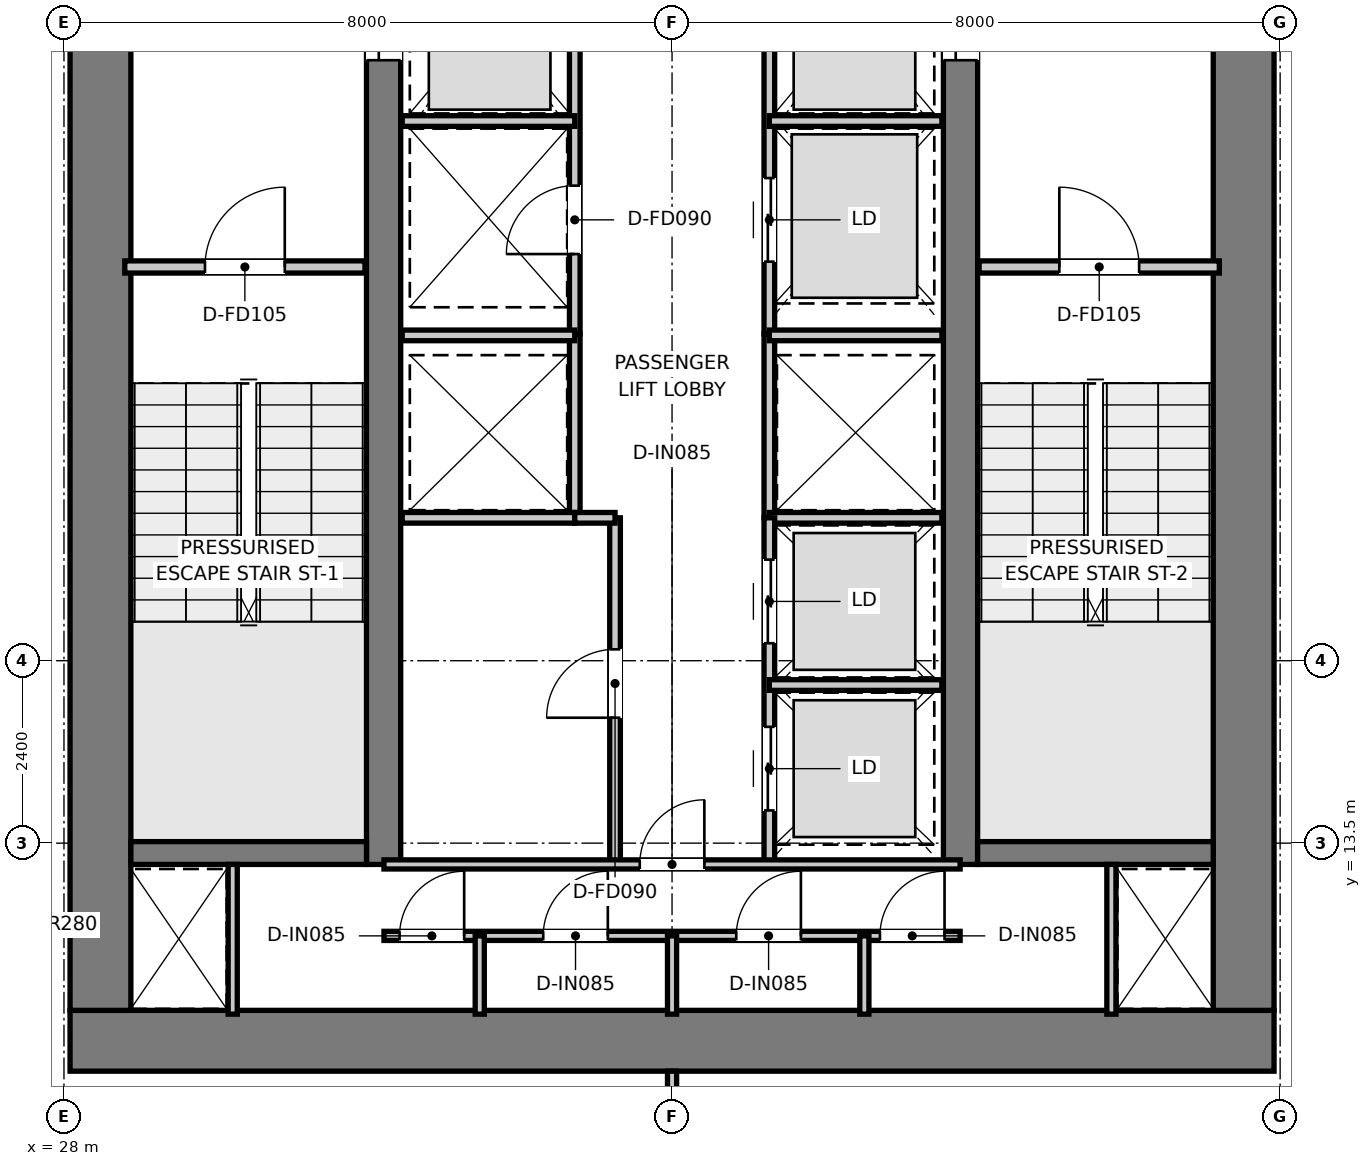
"""IFC4 building model, lengths in metres.
Left out: names, types, materials, properties, quantities, classifications, styles, units other than length and angle.
Written with IfcOpenShell. Run it as: python <this file> out.ifc"""

import sys

from ifc_helpers import new_model, si_unit, direction, frame, frame_2d, origin, place, context, subcontext, project, spatial, rectangle, extrude, element, fill, save


model = new_model("IFC4")
c1 = context("Model", 3, precision=1e-05, world=origin(), true_north=direction((0.0, 1.0)))
c2 = subcontext(c1, "Body", "Model", "MODEL_VIEW")
j1 = project(units=[si_unit("LENGTHUNIT", "METRE"), si_unit("PLANEANGLEUNIT", "RADIAN")], contexts=[c1])
p1 = place(None, origin())
s1 = spatial("IfcSite", under=j1, at=p1, CompositionType="ELEMENT")
p2 = place(p1, origin())
s2 = spatial("IfcBuilding", under=s1, at=p2, CompositionType="ELEMENT")
p3 = place(p2, frame((0.0, 0.0, 250.75)))
s3 = spatial("IfcBuildingStorey", under=s2, at=p3, CompositionType="ELEMENT", Elevation=250.75)
p4 = place(p3, frame((28.08, 10.9, 0.0), z_axis=(0.0, 0.0, 1.0), x_axis=(1.0, 0.0, 0.0)))
e1 = element("IfcWall", 1, at=p4, inside=s3, PredefinedType="SHEAR", context=c2, shape_type="SweptSolid", body=[
    extrude(rectangle(XDim=15.84, YDim=0.8, at=frame_2d((7.92, 0.0))), origin(), (0.0, 0.0, 1.0), 3.95),
])
for number, where, z_axis, x_axis in (
    (2, (28.48, 11.3, 0.0), (0.0, 0.0, 1.0), (0.0, 1.0, 0.0)),
    (3, (43.52, 11.3, 0.0), (0.0, 0.0, 1.0), (0.0, 1.0, 0.0)),
):
    element("IfcWall", number, at=place(p3, frame(where, z_axis=z_axis, x_axis=x_axis)), inside=s3, PredefinedType="SHEAR", context=c2, shape_type="SweptSolid", body=[
        extrude(rectangle(XDim=14.7, YDim=0.8, at=frame_2d((7.35, 0.0))), origin(), (0.0, 0.0, 1.0), 3.95),
    ])
p5 = place(p3, frame((32.205, 13.22, 0.0), z_axis=(0.0, 0.0, 1.0), x_axis=(0.0, 1.0, 0.0)))
e4 = element("IfcWall", 4, at=p5, inside=s3, PredefinedType="SHEAR", context=c2, shape_type="SweptSolid", body=[
    extrude(rectangle(XDim=12.78, YDim=0.45, at=frame_2d((6.39, 0.0))), origin(), (0.0, 0.0, 1.0), 3.95),
])
p6 = place(p5, frame((10.58, 0.0, 0.0)))
e5 = element("IfcOpeningElement", 5, at=p6, cuts=e4, PredefinedType="OPENING", context=c2, shape_type="SweptSolid", body=[
    extrude(rectangle(XDim=1.1, YDim=2.15, at=frame_2d((0.55, 1.075))), frame((0.0, 0.235, 0.0), z_axis=(0.0, -1.0, 0.0), x_axis=(1.0, 0.0, 0.0)), (0.0, 0.0, 1.0), 0.47),
])
p7 = place(p3, frame((39.795, 13.22, 0.0), z_axis=(0.0, 0.0, 1.0), x_axis=(0.0, 1.0, 0.0)))
e6 = element("IfcWall", 6, at=p7, inside=s3, PredefinedType="SHEAR", context=c2, shape_type="SweptSolid", body=[
    extrude(rectangle(XDim=12.78, YDim=0.45, at=frame_2d((6.39, 0.0))), origin(), (0.0, 0.0, 1.0), 3.95),
])
p8 = place(p7, frame((10.58, 0.0, 0.0)))
e7 = element("IfcOpeningElement", 7, at=p8, cuts=e6, PredefinedType="OPENING", context=c2, shape_type="SweptSolid", body=[
    extrude(rectangle(XDim=1.1, YDim=2.15, at=frame_2d((0.55, 1.075))), frame((0.0, 0.235, 0.0), z_axis=(0.0, -1.0, 0.0), x_axis=(1.0, 0.0, 0.0)), (0.0, 0.0, 1.0), 0.47),
])
for number, where, z_axis, x_axis in (
    (8, (28.88, 13.37, 0.0), (0.0, 0.0, 1.0), (1.0, 0.0, 0.0)),
    (9, (40.02, 13.37, 0.0), (0.0, 0.0, 1.0), (1.0, 0.0, 0.0)),
):
    element("IfcWall", number, at=place(p3, frame(where, z_axis=z_axis, x_axis=x_axis)), inside=s3, PredefinedType="SHEAR", context=c2, shape_type="SweptSolid", body=[
        extrude(rectangle(XDim=3.1, YDim=0.3, at=frame_2d((1.55, 0.0))), origin(), (0.0, 0.0, 1.0), 3.95),
    ])
p9 = place(p3, frame((28.8, 21.08, 0.0), z_axis=(0.0, 0.0, 1.0), x_axis=(1.0, 0.0, 0.0)))
e10 = element("IfcWall", 10, at=p9, inside=s3, PredefinedType="PARTITIONING", context=c2, shape_type="SweptSolid", body=[
    extrude(rectangle(XDim=3.16, YDim=0.16, at=frame_2d((1.58, 0.0))), origin(), (0.0, 0.0, 1.0), 3.67),
])
p10 = place(p9, frame((1.055, 0.0, 0.0)))
e11 = element("IfcOpeningElement", 11, at=p10, cuts=e10, PredefinedType="OPENING", context=c2, shape_type="SweptSolid", body=[
    extrude(rectangle(XDim=1.05, YDim=2.1, at=frame_2d((0.525, 1.05))), frame((0.0, 0.09, 0.0), z_axis=(0.0, -1.0, 0.0), x_axis=(1.0, 0.0, 0.0)), (0.0, 0.0, 1.0), 0.18),
])
p11 = place(p3, frame((40.04, 21.08, 0.0), z_axis=(0.0, 0.0, 1.0), x_axis=(1.0, 0.0, 0.0)))
e12 = element("IfcWall", 12, at=p11, inside=s3, PredefinedType="PARTITIONING", context=c2, shape_type="SweptSolid", body=[
    extrude(rectangle(XDim=3.16, YDim=0.16, at=frame_2d((1.58, 0.0))), origin(), (0.0, 0.0, 1.0), 3.67),
])
p12 = place(p11, frame((1.055, 0.0, 0.0)))
e13 = element("IfcOpeningElement", 13, at=p12, cuts=e12, PredefinedType="OPENING", context=c2, shape_type="SweptSolid", body=[
    extrude(rectangle(XDim=1.05, YDim=2.1, at=frame_2d((0.525, 1.05))), frame((0.0, 0.09, 0.0), z_axis=(0.0, -1.0, 0.0), x_axis=(1.0, 0.0, 0.0)), (0.0, 0.0, 1.0), 0.18),
])
p13 = place(p3, frame((34.72, 20.2, 0.0), z_axis=(0.0, 0.0, 1.0), x_axis=(0.0, 1.0, 0.0)))
e14 = element("IfcWall", 14, at=p13, inside=s3, PredefinedType="PARTITIONING", context=c2, shape_type="SweptSolid", body=[
    extrude(rectangle(XDim=5.78, YDim=0.14, at=frame_2d((2.89, 0.0))), origin(), (0.0, 0.0, 1.0), 2.82),
])
p14 = place(p13, frame((1.05, 0.0, 0.0)))
e15 = element("IfcOpeningElement", 15, at=p14, cuts=e14, PredefinedType="OPENING", context=c2, shape_type="SweptSolid", body=[
    extrude(rectangle(XDim=0.9, YDim=2.1, at=frame_2d((0.45, 1.05))), frame((0.0, 0.08, 0.0), z_axis=(0.0, -1.0, 0.0), x_axis=(1.0, 0.0, 0.0)), (0.0, 0.0, 1.0), 0.16),
])
p15 = place(p3, frame((37.28, 20.2, 0.0), z_axis=(0.0, 0.0, 1.0), x_axis=(0.0, 1.0, 0.0)))
e16 = element("IfcWall", 16, at=p15, inside=s3, PredefinedType="PARTITIONING", context=c2, shape_type="SweptSolid", body=[
    extrude(rectangle(XDim=5.78, YDim=0.14, at=frame_2d((2.89, 0.0))), origin(), (0.0, 0.0, 1.0), 2.82),
])
p16 = place(p15, frame((0.95, 0.0, 0.0)))
e17 = element("IfcOpeningElement", 17, at=p16, cuts=e16, PredefinedType="OPENING", context=c2, shape_type="SweptSolid", body=[
    extrude(rectangle(XDim=1.1, YDim=2.15, at=frame_2d((0.55, 1.075))), frame((0.0, 0.08, 0.0), z_axis=(0.0, -1.0, 0.0), x_axis=(1.0, 0.0, 0.0)), (0.0, 0.0, 1.0), 0.16),
])
for number, where, z_axis, x_axis in (
    (18, (32.45, 23.0, 0.0), (0.0, 0.0, 1.0), (1.0, 0.0, 0.0)),
    (19, (37.28, 23.0, 0.0), (0.0, 0.0, 1.0), (1.0, 0.0, 0.0)),
):
    element("IfcWall", number, at=place(p3, frame(where, z_axis=z_axis, x_axis=x_axis)), inside=s3, PredefinedType="PARTITIONING", context=c2, shape_type="SweptSolid", body=[
        extrude(rectangle(XDim=2.27, YDim=0.14, at=frame_2d((1.135, 0.0))), origin(), (0.0, 0.0, 1.0), 2.82),
    ])
for number, where, z_axis, x_axis in (
    (20, (34.72, 17.78, 0.0), (0.0, 0.0, 1.0), (0.0, 1.0, 0.0)),
    (21, (37.28, 17.78, 0.0), (0.0, 0.0, 1.0), (0.0, 1.0, 0.0)),
):
    element("IfcWall", number, at=place(p3, frame(where, z_axis=z_axis, x_axis=x_axis)), inside=s3, PredefinedType="PARTITIONING", context=c2, shape_type="SweptSolid", body=[
        extrude(rectangle(XDim=2.42, YDim=0.14, at=frame_2d((1.21, 0.0))), origin(), (0.0, 0.0, 1.0), 3.67),
    ])
for number, where, z_axis, x_axis in (
    (22, (32.45, 17.78, 0.0), (0.0, 0.0, 1.0), (1.0, 0.0, 0.0)),
    (23, (32.45, 20.18, 0.0), (0.0, 0.0, 1.0), (1.0, 0.0, 0.0)),
    (24, (37.28, 17.78, 0.0), (0.0, 0.0, 1.0), (1.0, 0.0, 0.0)),
    (25, (37.28, 20.18, 0.0), (0.0, 0.0, 1.0), (1.0, 0.0, 0.0)),
):
    element("IfcWall", number, at=place(p3, frame(where, z_axis=z_axis, x_axis=x_axis)), inside=s3, PredefinedType="PARTITIONING", context=c2, shape_type="SweptSolid", body=[
        extrude(rectangle(XDim=2.27, YDim=0.14, at=frame_2d((1.135, 0.0))), origin(), (0.0, 0.0, 1.0), 3.67),
    ])
p17 = place(p3, frame((35.25, 13.22, 0.0), z_axis=(0.0, 0.0, 1.0), x_axis=(0.0, 1.0, 0.0)))
e26 = element("IfcWall", 26, at=p17, inside=s3, PredefinedType="PARTITIONING", context=c2, shape_type="SweptSolid", body=[
    extrude(rectangle(XDim=4.56, YDim=0.14, at=frame_2d((2.28, 0.0))), origin(), (0.0, 0.0, 1.0), 3.67),
])
p18 = place(p17, frame((1.93, 0.0, 0.0)))
e27 = element("IfcOpeningElement", 27, at=p18, cuts=e26, PredefinedType="OPENING", context=c2, shape_type="SweptSolid", body=[
    extrude(rectangle(XDim=0.9, YDim=2.1, at=frame_2d((0.45, 1.05))), frame((0.0, 0.08, 0.0), z_axis=(0.0, -1.0, 0.0), x_axis=(1.0, 0.0, 0.0)), (0.0, 0.0, 1.0), 0.16),
])
p19 = place(p3, frame((34.72, 17.78, 0.0), z_axis=(0.0, 0.0, 1.0), x_axis=(1.0, 0.0, 0.0)))
e28 = element("IfcWall", 28, at=p19, inside=s3, PredefinedType="PARTITIONING", context=c2, shape_type="SweptSolid", body=[
    extrude(rectangle(XDim=0.53, YDim=0.14, at=frame_2d((0.265, 0.0))), origin(), (0.0, 0.0, 1.0), 3.67),
])
p20 = place(p3, frame((37.28, 13.22, 0.0), z_axis=(0.0, 0.0, 1.0), x_axis=(0.0, 1.0, 0.0)))
e29 = element("IfcWall", 29, at=p20, inside=s3, PredefinedType="PARTITIONING", context=c2, shape_type="SweptSolid", body=[
    extrude(rectangle(XDim=4.56, YDim=0.14, at=frame_2d((2.28, 0.0))), origin(), (0.0, 0.0, 1.0), 3.67),
])
p21 = place(p20, frame((0.71, 0.0, 0.0)))
e30 = element("IfcOpeningElement", 30, at=p21, cuts=e29, PredefinedType="OPENING", context=c2, shape_type="SweptSolid", body=[
    extrude(rectangle(XDim=1.1, YDim=2.15, at=frame_2d((0.55, 1.075))), frame((0.0, 0.08, 0.0), z_axis=(0.0, -1.0, 0.0), x_axis=(1.0, 0.0, 0.0)), (0.0, 0.0, 1.0), 0.16),
])
p22 = place(p20, frame((2.91, 0.0, 0.0)))
e31 = element("IfcOpeningElement", 31, at=p22, cuts=e29, PredefinedType="OPENING", context=c2, shape_type="SweptSolid", body=[
    extrude(rectangle(XDim=1.1, YDim=2.15, at=frame_2d((0.55, 1.075))), frame((0.0, 0.08, 0.0), z_axis=(0.0, -1.0, 0.0), x_axis=(1.0, 0.0, 0.0)), (0.0, 0.0, 1.0), 0.16),
])
p23 = place(p3, frame((37.28, 15.58, 0.0), z_axis=(0.0, 0.0, 1.0), x_axis=(1.0, 0.0, 0.0)))
e32 = element("IfcWall", 32, at=p23, inside=s3, PredefinedType="PARTITIONING", context=c2, shape_type="SweptSolid", body=[
    extrude(rectangle(XDim=2.27, YDim=0.14, at=frame_2d((1.135, 0.0))), origin(), (0.0, 0.0, 1.0), 3.67),
])
for number, where, z_axis, x_axis in (
    (33, (30.22, 11.25, 0.0), (0.0, 0.0, 1.0), (0.0, 1.0, 0.0)),
    (34, (41.78, 11.25, 0.0), (0.0, 0.0, 1.0), (0.0, 1.0, 0.0)),
):
    element("IfcWall", number, at=place(p3, frame(where, z_axis=z_axis, x_axis=x_axis)), inside=s3, PredefinedType="PARTITIONING", context=c2, shape_type="SweptSolid", body=[
        extrude(rectangle(XDim=1.97, YDim=0.12, at=frame_2d((0.985, 0.0))), origin(), (0.0, 0.0, 1.0), 3.67),
    ])
p24 = place(p3, frame((32.21, 13.22, 0.0), z_axis=(0.0, 0.0, 1.0), x_axis=(1.0, 0.0, 0.0)))
e35 = element("IfcWall", 35, at=p24, inside=s3, PredefinedType="PARTITIONING", context=c2, shape_type="SweptSolid", body=[
    extrude(rectangle(XDim=7.58, YDim=0.12, at=frame_2d((3.79, 0.0))), origin(), (0.0, 0.0, 1.0), 3.67),
])
p25 = place(p24, frame((3.365, 0.0, 0.0)))
e36 = element("IfcOpeningElement", 36, at=p25, cuts=e35, PredefinedType="OPENING", context=c2, shape_type="SweptSolid", body=[
    extrude(rectangle(XDim=0.85, YDim=2.1, at=frame_2d((0.425, 1.05))), frame((0.0, 0.07, 0.0), z_axis=(0.0, -1.0, 0.0), x_axis=(1.0, 0.0, 0.0)), (0.0, 0.0, 1.0), 0.14),
])
p26 = place(p3, frame((32.21, 12.28, 0.0), z_axis=(0.0, 0.0, 1.0), x_axis=(1.0, 0.0, 0.0)))
e37 = element("IfcWall", 37, at=p26, inside=s3, PredefinedType="PARTITIONING", context=c2, shape_type="SweptSolid", body=[
    extrude(rectangle(XDim=7.58, YDim=0.12, at=frame_2d((3.79, 0.0))), origin(), (0.0, 0.0, 1.0), 3.67),
])
p27 = place(p26, frame((0.205, 0.0, 0.0)))
e38 = element("IfcOpeningElement", 38, at=p27, cuts=e37, PredefinedType="OPENING", context=c2, shape_type="SweptSolid", body=[
    extrude(rectangle(XDim=0.85, YDim=2.1, at=frame_2d((0.425, 1.05))), frame((0.0, 0.07, 0.0), z_axis=(0.0, -1.0, 0.0), x_axis=(1.0, 0.0, 0.0)), (0.0, 0.0, 1.0), 0.14),
])
p28 = place(p26, frame((2.095, 0.0, 0.0)))
e39 = element("IfcOpeningElement", 39, at=p28, cuts=e37, PredefinedType="OPENING", context=c2, shape_type="SweptSolid", body=[
    extrude(rectangle(XDim=0.85, YDim=2.1, at=frame_2d((0.425, 1.05))), frame((0.0, 0.07, 0.0), z_axis=(0.0, -1.0, 0.0), x_axis=(1.0, 0.0, 0.0)), (0.0, 0.0, 1.0), 0.14),
])
p29 = place(p26, frame((4.635, 0.0, 0.0)))
e40 = element("IfcOpeningElement", 40, at=p29, cuts=e37, PredefinedType="OPENING", context=c2, shape_type="SweptSolid", body=[
    extrude(rectangle(XDim=0.85, YDim=2.1, at=frame_2d((0.425, 1.05))), frame((0.0, 0.07, 0.0), z_axis=(0.0, -1.0, 0.0), x_axis=(1.0, 0.0, 0.0)), (0.0, 0.0, 1.0), 0.14),
])
p30 = place(p26, frame((6.525, 0.0, 0.0)))
e41 = element("IfcOpeningElement", 41, at=p30, cuts=e37, PredefinedType="OPENING", context=c2, shape_type="SweptSolid", body=[
    extrude(rectangle(XDim=0.85, YDim=2.1, at=frame_2d((0.425, 1.05))), frame((0.0, 0.07, 0.0), z_axis=(0.0, -1.0, 0.0), x_axis=(1.0, 0.0, 0.0)), (0.0, 0.0, 1.0), 0.14),
])
for number, where, z_axis, x_axis in (
    (42, (33.47, 11.25, 0.0), (0.0, 0.0, 1.0), (0.0, 1.0, 0.0)),
    (43, (36.0, 11.25, 0.0), (0.0, 0.0, 1.0), (0.0, 1.0, 0.0)),
    (44, (38.53, 11.25, 0.0), (0.0, 0.0, 1.0), (0.0, 1.0, 0.0)),
):
    element("IfcWall", number, at=place(p3, frame(where, z_axis=z_axis, x_axis=x_axis)), inside=s3, PredefinedType="PARTITIONING", context=c2, shape_type="SweptSolid", body=[
        extrude(rectangle(XDim=1.03, YDim=0.12, at=frame_2d((0.515, 0.0))), origin(), (0.0, 0.0, 1.0), 3.67),
    ])
p31 = place(p3, frame((36.0, 3.475, 0.0), z_axis=(0.0, 0.0, 1.0), x_axis=(0.0, 1.0, 0.0)))
e45 = element("IfcWall", 45, at=p31, inside=s3, PredefinedType="PARTITIONING", context=c2, shape_type="SweptSolid", body=[
    extrude(rectangle(XDim=7.025, YDim=0.12, at=frame_2d((3.512, 0.0))), origin(), (0.0, 0.0, 1.0), 3.67),
])
p32 = place(p10, origin())
e46 = element("IfcDoor", 46, at=p32, inside=s3, OperationType="SINGLE_SWING_RIGHT", PredefinedType="DOOR", context=c2, shape_type="SweptSolid", body=[
    extrude(rectangle(XDim=1.05, YDim=2.1, at=frame_2d((0.525, 1.05))), frame((0.0, 0.025, 0.0), z_axis=(0.0, -1.0, 0.0), x_axis=(1.0, 0.0, 0.0)), (0.0, 0.0, 1.0), 0.05),
])
fill(e11, e46)
p33 = place(p12, origin())
e47 = element("IfcDoor", 47, at=p33, inside=s3, OperationType="SINGLE_SWING_LEFT", PredefinedType="DOOR", context=c2, shape_type="SweptSolid", body=[
    extrude(rectangle(XDim=1.05, YDim=2.1, at=frame_2d((0.525, 1.05))), frame((0.0, 0.025, 0.0), z_axis=(0.0, -1.0, 0.0), x_axis=(1.0, 0.0, 0.0)), (0.0, 0.0, 1.0), 0.05),
])
fill(e13, e47)
p34 = place(p6, origin())
e48 = element("IfcDoor", 48, at=p34, inside=s3, OperationType="DOUBLE_DOOR_SLIDING", PredefinedType="DOOR", context=c2, shape_type="SweptSolid", body=[
    extrude(rectangle(XDim=1.1, YDim=2.15, at=frame_2d((0.55, 1.075))), frame((0.0, 0.025, 0.0), z_axis=(0.0, -1.0, 0.0), x_axis=(1.0, 0.0, 0.0)), (0.0, 0.0, 1.0), 0.05),
])
fill(e5, e48)
p35 = place(p8, origin())
e49 = element("IfcDoor", 49, at=p35, inside=s3, OperationType="DOUBLE_DOOR_SLIDING", PredefinedType="DOOR", context=c2, shape_type="SweptSolid", body=[
    extrude(rectangle(XDim=1.1, YDim=2.15, at=frame_2d((0.55, 1.075))), frame((0.0, 0.025, 0.0), z_axis=(0.0, -1.0, 0.0), x_axis=(1.0, 0.0, 0.0)), (0.0, 0.0, 1.0), 0.05),
])
fill(e7, e49)
p36 = place(p14, origin())
e50 = element("IfcDoor", 50, at=p36, inside=s3, OperationType="SINGLE_SWING_LEFT", PredefinedType="DOOR", context=c2, shape_type="SweptSolid", body=[
    extrude(rectangle(XDim=0.9, YDim=2.1, at=frame_2d((0.45, 1.05))), frame((0.0, 0.025, 0.0), z_axis=(0.0, -1.0, 0.0), x_axis=(1.0, 0.0, 0.0)), (0.0, 0.0, 1.0), 0.05),
])
fill(e15, e50)
p37 = place(p16, origin())
e51 = element("IfcDoor", 51, at=p37, inside=s3, OperationType="DOUBLE_DOOR_SLIDING", PredefinedType="DOOR", context=c2, shape_type="SweptSolid", body=[
    extrude(rectangle(XDim=1.1, YDim=2.15, at=frame_2d((0.55, 1.075))), frame((0.0, 0.025, 0.0), z_axis=(0.0, -1.0, 0.0), x_axis=(1.0, 0.0, 0.0)), (0.0, 0.0, 1.0), 0.05),
])
fill(e17, e51)
p38 = place(p18, origin())
e52 = element("IfcDoor", 52, at=p38, inside=s3, OperationType="SINGLE_SWING_LEFT", PredefinedType="DOOR", context=c2, shape_type="SweptSolid", body=[
    extrude(rectangle(XDim=0.9, YDim=2.1, at=frame_2d((0.45, 1.05))), frame((0.0, 0.025, 0.0), z_axis=(0.0, -1.0, 0.0), x_axis=(1.0, 0.0, 0.0)), (0.0, 0.0, 1.0), 0.05),
])
fill(e27, e52)
p39 = place(p21, origin())
e53 = element("IfcDoor", 53, at=p39, inside=s3, OperationType="DOUBLE_DOOR_SLIDING", PredefinedType="DOOR", context=c2, shape_type="SweptSolid", body=[
    extrude(rectangle(XDim=1.1, YDim=2.15, at=frame_2d((0.55, 1.075))), frame((0.0, 0.025, 0.0), z_axis=(0.0, -1.0, 0.0), x_axis=(1.0, 0.0, 0.0)), (0.0, 0.0, 1.0), 0.05),
])
fill(e30, e53)
p40 = place(p22, origin())
e54 = element("IfcDoor", 54, at=p40, inside=s3, OperationType="DOUBLE_DOOR_SLIDING", PredefinedType="DOOR", context=c2, shape_type="SweptSolid", body=[
    extrude(rectangle(XDim=1.1, YDim=2.15, at=frame_2d((0.55, 1.075))), frame((0.0, 0.025, 0.0), z_axis=(0.0, -1.0, 0.0), x_axis=(1.0, 0.0, 0.0)), (0.0, 0.0, 1.0), 0.05),
])
fill(e31, e54)
p41 = place(p25, origin())
e55 = element("IfcDoor", 55, at=p41, inside=s3, OperationType="SINGLE_SWING_RIGHT", PredefinedType="DOOR", context=c2, shape_type="SweptSolid", body=[
    extrude(rectangle(XDim=0.85, YDim=2.1, at=frame_2d((0.425, 1.05))), frame((0.0, 0.025, 0.0), z_axis=(0.0, -1.0, 0.0), x_axis=(1.0, 0.0, 0.0)), (0.0, 0.0, 1.0), 0.05),
])
fill(e36, e55)
p42 = place(p27, origin())
e56 = element("IfcDoor", 56, at=p42, inside=s3, OperationType="SINGLE_SWING_RIGHT", PredefinedType="DOOR", context=c2, shape_type="SweptSolid", body=[
    extrude(rectangle(XDim=0.85, YDim=2.1, at=frame_2d((0.425, 1.05))), frame((0.0, 0.025, 0.0), z_axis=(0.0, -1.0, 0.0), x_axis=(1.0, 0.0, 0.0)), (0.0, 0.0, 1.0), 0.05),
])
fill(e38, e56)
p43 = place(p28, origin())
e57 = element("IfcDoor", 57, at=p43, inside=s3, OperationType="SINGLE_SWING_RIGHT", PredefinedType="DOOR", context=c2, shape_type="SweptSolid", body=[
    extrude(rectangle(XDim=0.85, YDim=2.1, at=frame_2d((0.425, 1.05))), frame((0.0, 0.025, 0.0), z_axis=(0.0, -1.0, 0.0), x_axis=(1.0, 0.0, 0.0)), (0.0, 0.0, 1.0), 0.05),
])
fill(e39, e57)
p44 = place(p29, origin())
e58 = element("IfcDoor", 58, at=p44, inside=s3, OperationType="SINGLE_SWING_RIGHT", PredefinedType="DOOR", context=c2, shape_type="SweptSolid", body=[
    extrude(rectangle(XDim=0.85, YDim=2.1, at=frame_2d((0.425, 1.05))), frame((0.0, 0.025, 0.0), z_axis=(0.0, -1.0, 0.0), x_axis=(1.0, 0.0, 0.0)), (0.0, 0.0, 1.0), 0.05),
])
fill(e40, e58)
p45 = place(p30, origin())
e59 = element("IfcDoor", 59, at=p45, inside=s3, OperationType="SINGLE_SWING_RIGHT", PredefinedType="DOOR", context=c2, shape_type="SweptSolid", body=[
    extrude(rectangle(XDim=0.85, YDim=2.1, at=frame_2d((0.425, 1.05))), frame((0.0, 0.025, 0.0), z_axis=(0.0, -1.0, 0.0), x_axis=(1.0, 0.0, 0.0)), (0.0, 0.0, 1.0), 0.05),
])
fill(e41, e59)
save(model, sys.argv[1])
